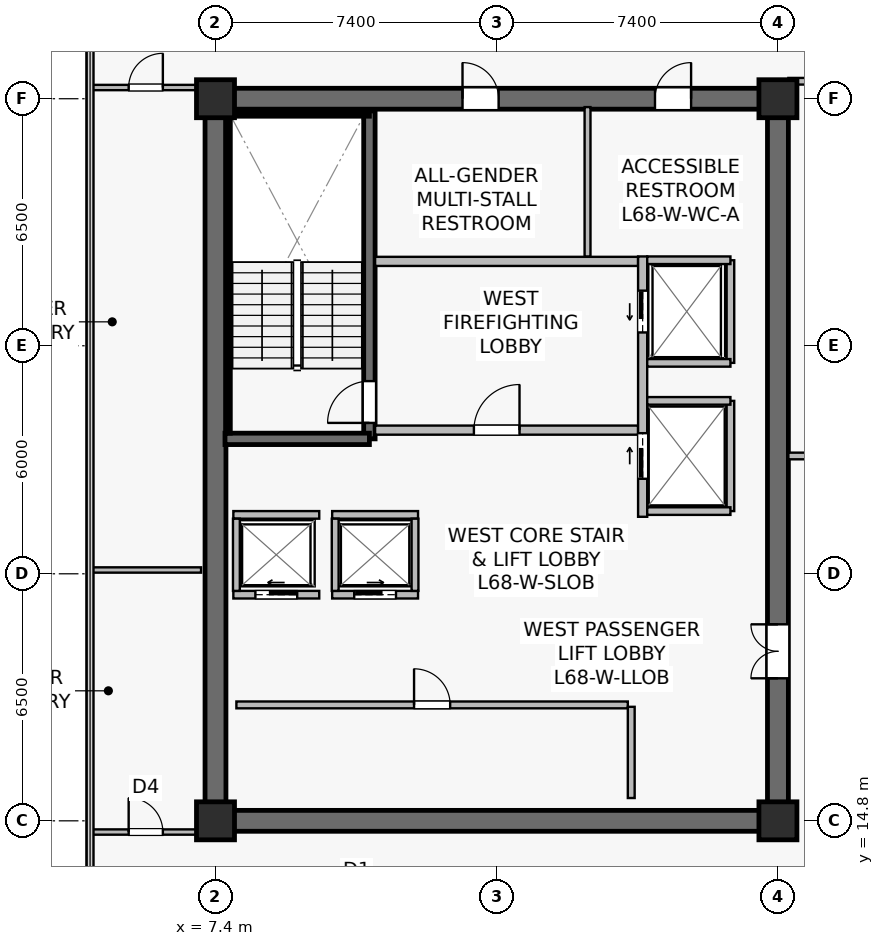
"""IFC4 building model, lengths in metres.
Left out: names, types, materials, properties, quantities, classifications, styles, units other than length and angle.
Written with IfcOpenShell. Run it as: python <this file> out.ifc"""

import sys

from ifc_helpers import new_model, si_unit, direction, frame, frame_2d, origin, origin_2d, place, context, subcontext, project, spatial, rectangle, extrude, source, transform, mapped, element, fill, save


model = new_model("IFC4")
c1 = context("Model", 3, precision=1e-05, world=origin(), true_north=direction((0.0, 1.0)))
c2 = subcontext(c1, "Body", "Model", "MODEL_VIEW")
j1 = project(units=[si_unit("LENGTHUNIT", "METRE"), si_unit("PLANEANGLEUNIT", "RADIAN")], contexts=[c1])
p1 = place(None, origin())
s1 = spatial("IfcSite", under=j1, at=p1, CompositionType="ELEMENT")
p2 = place(p1, origin())
s2 = spatial("IfcBuilding", under=s1, at=p2, CompositionType="ELEMENT")
p3 = place(p2, frame((0.0, 0.0, 283.4)))
s3 = spatial("IfcBuildingStorey", under=s2, at=p3, CompositionType="ELEMENT", Elevation=283.4)
p4 = place(p3, frame((7.125, 14.8, 0.0), z_axis=(0.0, 0.0, 1.0), x_axis=(1.0, 0.0, 0.0)))
e1 = element("IfcWall", 1, at=p4, inside=s3, PredefinedType="SHEAR", context=c2, shape_type="SweptSolid", body=[
    extrude(rectangle(XDim=15.35, YDim=0.55, at=frame_2d((7.675, 0.0))), origin(), (0.0, 0.0, 1.0), 3.8),
])
p5 = place(p3, frame((7.125, 33.8, 0.0), z_axis=(0.0, 0.0, 1.0), x_axis=(1.0, 0.0, 0.0)))
e2 = element("IfcWall", 2, at=p5, inside=s3, PredefinedType="SHEAR", context=c2, shape_type="SweptSolid", body=[
    extrude(rectangle(XDim=15.35, YDim=0.55, at=frame_2d((7.675, 0.0))), origin(), (0.0, 0.0, 1.0), 3.8),
])
p6 = place(p5, frame((6.775, 0.0, 0.0)))
e3 = element("IfcOpeningElement", 3, at=p6, cuts=e2, PredefinedType="OPENING", context=c2, shape_type="SweptSolid", body=[
    extrude(rectangle(XDim=0.95, YDim=2.15, at=frame_2d((0.475, 1.075))), frame((0.0, 0.285, 0.0), z_axis=(0.0, -1.0, 0.0), x_axis=(1.0, 0.0, 0.0)), (0.0, 0.0, 1.0), 0.57),
])
p7 = place(p5, frame((11.84, 0.0, 0.0)))
e4 = element("IfcOpeningElement", 4, at=p7, cuts=e2, PredefinedType="OPENING", context=c2, shape_type="SweptSolid", body=[
    extrude(rectangle(XDim=0.95, YDim=2.15, at=frame_2d((0.475, 1.075))), frame((0.0, 0.285, 0.0), z_axis=(0.0, -1.0, 0.0), x_axis=(1.0, 0.0, 0.0)), (0.0, 0.0, 1.0), 0.57),
])
p8 = place(p3, frame((7.4, 15.075, 0.0), z_axis=(0.0, 0.0, 1.0), x_axis=(0.0, 1.0, 0.0)))
e5 = element("IfcWall", 5, at=p8, inside=s3, PredefinedType="SHEAR", context=c2, shape_type="SweptSolid", body=[
    extrude(rectangle(XDim=18.45, YDim=0.55, at=frame_2d((9.225, 0.0))), origin(), (0.0, 0.0, 1.0), 3.8),
])
p9 = place(p3, frame((22.2, 15.075, 0.0), z_axis=(0.0, 0.0, 1.0), x_axis=(0.0, 1.0, 0.0)))
e6 = element("IfcWall", 6, at=p9, inside=s3, PredefinedType="SHEAR", context=c2, shape_type="SweptSolid", body=[
    extrude(rectangle(XDim=18.45, YDim=0.55, at=frame_2d((9.225, 0.0))), origin(), (0.0, 0.0, 1.0), 3.8),
])
p10 = place(p9, frame((3.475, 0.0, 0.0)))
e7 = element("IfcOpeningElement", 7, at=p10, cuts=e6, PredefinedType="OPENING", context=c2, shape_type="SweptSolid", body=[
    extrude(rectangle(XDim=1.42, YDim=2.2, at=frame_2d((0.71, 1.1))), frame((0.0, 0.285, 0.0), z_axis=(0.0, -1.0, 0.0), x_axis=(1.0, 0.0, 0.0)), (0.0, 0.0, 1.0), 0.57),
])
p11 = place(p3, frame((11.45, 24.85, 0.0), z_axis=(0.0, 0.0, 1.0), x_axis=(0.0, 1.0, 0.0)))
e8 = element("IfcWall", 8, at=p11, inside=s3, PredefinedType="SHEAR", context=c2, shape_type="SweptSolid", body=[
    extrude(rectangle(XDim=8.63, YDim=0.3, at=frame_2d((4.315, 0.0))), origin(), (0.0, 0.0, 1.0), 3.8),
])
p12 = place(p11, frame((0.42, 0.0, 0.0)))
e9 = element("IfcOpeningElement", 9, at=p12, cuts=e8, PredefinedType="OPENING", context=c2, shape_type="SweptSolid", body=[
    extrude(rectangle(XDim=1.1, YDim=2.15, at=frame_2d((0.55, 1.075))), frame((0.0, 0.16, 0.0), z_axis=(0.0, -1.0, 0.0), x_axis=(1.0, 0.0, 0.0)), (0.0, 0.0, 1.0), 0.32),
])
p13 = place(p3, frame((7.65, 24.85, 0.0), z_axis=(0.0, 0.0, 1.0), x_axis=(1.0, 0.0, 0.0)))
e10 = element("IfcWall", 10, at=p13, inside=s3, PredefinedType="SHEAR", context=c2, shape_type="SweptSolid", body=[
    extrude(rectangle(XDim=3.8, YDim=0.3, at=frame_2d((1.9, 0.0))), origin(), (0.0, 0.0, 1.0), 3.8),
])
p14 = place(p3, frame((7.73, 33.4, 0.0), z_axis=(0.0, 0.0, 1.0), x_axis=(1.0, 0.0, 0.0)))
e11 = element("IfcWall", 11, at=p14, inside=s3, PredefinedType="SOLIDWALL", context=c2, shape_type="SweptSolid", body=[
    extrude(rectangle(XDim=3.72, YDim=0.12, at=frame_2d((1.86, 0.0))), origin(), (0.0, 0.0, 1.0), 3.8),
])
p15 = place(p3, frame((7.73, 25.0, 0.0), z_axis=(0.0, 0.0, 1.0), x_axis=(0.0, 1.0, 0.0)))
e12 = element("IfcWall", 12, at=p15, inside=s3, PredefinedType="SOLIDWALL", context=c2, shape_type="SweptSolid", body=[
    extrude(rectangle(XDim=8.32, YDim=0.12, at=frame_2d((4.16, 0.0))), origin(), (0.0, 0.0, 1.0), 3.8),
])
m1 = source(origin(), c2, "Body", "SweptSolid", [
    extrude(rectangle(XDim=1.0, YDim=1.0, at=origin_2d()), origin(), (0.0, 0.0, 1.0), 4.1),
])
for number, where, z_axis, x_axis in (
    (13, (7.4, 14.8, 0.0), (0.0, 0.0, 1.0), (1.0, 0.0, 0.0)),
    (14, (22.2, 14.8, 0.0), (0.0, 0.0, 1.0), (1.0, 0.0, 0.0)),
    (15, (7.4, 33.8, 0.0), (0.0, 0.0, 1.0), (1.0, 0.0, 0.0)),
    (16, (22.2, 33.8, 0.0), (0.0, 0.0, 1.0), (1.0, 0.0, 0.0)),
):
    element("IfcColumn", number, at=place(p3, frame(where, z_axis=z_axis, x_axis=x_axis)), inside=s3, PredefinedType="COLUMN", context=c2, shape_type="MappedRepresentation", body=[
        mapped(m1, transform((0.0, 0.0, 0.0), scale=1.0)),
    ])
p16 = place(p3, frame((11.6, 25.08, 0.0), z_axis=(0.0, 0.0, 1.0), x_axis=(1.0, 0.0, 0.0)))
e17 = element("IfcWall", 17, at=p16, inside=s3, PredefinedType="SOLIDWALL", context=c2, shape_type="SweptSolid", body=[
    extrude(rectangle(XDim=6.92, YDim=0.24, at=frame_2d((3.46, 0.0))), origin(), (0.0, 0.0, 1.0), 3.197),
])
p17 = place(p16, frame((2.6, 0.0, 0.0)))
e18 = element("IfcOpeningElement", 18, at=p17, cuts=e17, PredefinedType="OPENING", context=c2, shape_type="SweptSolid", body=[
    extrude(rectangle(XDim=1.2, YDim=2.16, at=frame_2d((0.6, 1.08))), frame((0.0, 0.13, 0.0), z_axis=(0.0, -1.0, 0.0), x_axis=(1.0, 0.0, 0.0)), (0.0, 0.0, 1.0), 0.26),
])
p18 = place(p3, frame((11.6, 29.52, 0.0), z_axis=(0.0, 0.0, 1.0), x_axis=(1.0, 0.0, 0.0)))
e19 = element("IfcWall", 19, at=p18, inside=s3, PredefinedType="SOLIDWALL", context=c2, shape_type="SweptSolid", body=[
    extrude(rectangle(XDim=6.92, YDim=0.24, at=frame_2d((3.46, 0.0))), origin(), (0.0, 0.0, 1.0), 3.197),
])
p19 = place(p3, frame((18.64, 22.8, 0.0), z_axis=(0.0, 0.0, 1.0), x_axis=(0.0, 1.0, 0.0)))
e20 = element("IfcWall", 20, at=p19, inside=s3, PredefinedType="SOLIDWALL", context=c2, shape_type="SweptSolid", body=[
    extrude(rectangle(XDim=6.85, YDim=0.24, at=frame_2d((3.425, 0.0))), origin(), (0.0, 0.0, 1.0), 2.935),
])
p20 = place(p19, frame((4.85, 0.0, 0.0)))
e21 = element("IfcOpeningElement", 21, at=p20, cuts=e20, PredefinedType="OPENING", context=c2, shape_type="SweptSolid", body=[
    extrude(rectangle(XDim=1.1, YDim=2.22, at=frame_2d((0.55, 1.11))), frame((0.0, 0.13, 0.0), z_axis=(0.0, -1.0, 0.0), x_axis=(1.0, 0.0, 0.0)), (0.0, 0.0, 1.0), 0.26),
])
p21 = place(p19, frame((1.0, 0.0, 0.0)))
e22 = element("IfcOpeningElement", 22, at=p21, cuts=e20, PredefinedType="OPENING", context=c2, shape_type="SweptSolid", body=[
    extrude(rectangle(XDim=1.2, YDim=2.22, at=frame_2d((0.6, 1.11))), frame((0.0, 0.13, 0.0), z_axis=(0.0, -1.0, 0.0), x_axis=(1.0, 0.0, 0.0)), (0.0, 0.0, 1.0), 0.26),
])
p22 = place(p3, frame((7.87, 20.75, 0.0), z_axis=(0.0, 0.0, 1.0), x_axis=(1.0, 0.0, 0.0)))
e23 = element("IfcWall", 23, at=p22, inside=s3, PredefinedType="SOLIDWALL", context=c2, shape_type="SweptSolid", body=[
    extrude(rectangle(XDim=2.26, YDim=0.2, at=frame_2d((1.13, 0.0))), origin(), (0.0, 0.0, 1.0), 3.8),
])
p23 = place(p22, frame((0.58, 0.0, 0.0)))
e24 = element("IfcOpeningElement", 24, at=p23, cuts=e23, PredefinedType="OPENING", context=c2, shape_type="SweptSolid", body=[
    extrude(rectangle(XDim=1.1, YDim=2.22, at=frame_2d((0.55, 1.11))), frame((0.0, 0.11, 0.0), z_axis=(0.0, -1.0, 0.0), x_axis=(1.0, 0.0, 0.0)), (0.0, 0.0, 1.0), 0.22),
])
p24 = place(p3, frame((7.87, 22.85, 0.0), z_axis=(0.0, 0.0, 1.0), x_axis=(1.0, 0.0, 0.0)))
e25 = element("IfcWall", 25, at=p24, inside=s3, PredefinedType="SOLIDWALL", context=c2, shape_type="SweptSolid", body=[
    extrude(rectangle(XDim=2.26, YDim=0.2, at=frame_2d((1.13, 0.0))), origin(), (0.0, 0.0, 1.0), 3.8),
])
p25 = place(p3, frame((7.95, 20.85, 0.0), z_axis=(0.0, 0.0, 1.0), x_axis=(0.0, 1.0, 0.0)))
e26 = element("IfcWall", 26, at=p25, inside=s3, PredefinedType="SOLIDWALL", context=c2, shape_type="SweptSolid", body=[
    extrude(rectangle(XDim=1.9, YDim=0.18, at=frame_2d((0.95, 0.0))), origin(), (0.0, 0.0, 1.0), 3.8),
])
p26 = place(p3, frame((10.47, 20.75, 0.0), z_axis=(0.0, 0.0, 1.0), x_axis=(1.0, 0.0, 0.0)))
e27 = element("IfcWall", 27, at=p26, inside=s3, PredefinedType="SOLIDWALL", context=c2, shape_type="SweptSolid", body=[
    extrude(rectangle(XDim=2.26, YDim=0.2, at=frame_2d((1.13, 0.0))), origin(), (0.0, 0.0, 1.0), 3.8),
])
p27 = place(p26, frame((0.58, 0.0, 0.0)))
e28 = element("IfcOpeningElement", 28, at=p27, cuts=e27, PredefinedType="OPENING", context=c2, shape_type="SweptSolid", body=[
    extrude(rectangle(XDim=1.1, YDim=2.22, at=frame_2d((0.55, 1.11))), frame((0.0, 0.11, 0.0), z_axis=(0.0, -1.0, 0.0), x_axis=(1.0, 0.0, 0.0)), (0.0, 0.0, 1.0), 0.22),
])
p28 = place(p3, frame((10.47, 22.85, 0.0), z_axis=(0.0, 0.0, 1.0), x_axis=(1.0, 0.0, 0.0)))
e29 = element("IfcWall", 29, at=p28, inside=s3, PredefinedType="SOLIDWALL", context=c2, shape_type="SweptSolid", body=[
    extrude(rectangle(XDim=2.26, YDim=0.2, at=frame_2d((1.13, 0.0))), origin(), (0.0, 0.0, 1.0), 3.8),
])
for number, where, z_axis, x_axis in (
    (30, (10.55, 20.85, 0.0), (0.0, 0.0, 1.0), (0.0, 1.0, 0.0)),
    (31, (12.65, 20.85, 0.0), (0.0, 0.0, 1.0), (0.0, 1.0, 0.0)),
):
    element("IfcWall", number, at=place(p3, frame(where, z_axis=z_axis, x_axis=x_axis)), inside=s3, PredefinedType="SOLIDWALL", context=c2, shape_type="SweptSolid", body=[
        extrude(rectangle(XDim=1.9, YDim=0.18, at=frame_2d((0.95, 0.0))), origin(), (0.0, 0.0, 1.0), 3.8),
    ])
p29 = place(p3, frame((20.95, 26.85, 0.0), z_axis=(0.0, 0.0, 1.0), x_axis=(0.0, 1.0, 0.0)))
e32 = element("IfcWall", 32, at=p29, inside=s3, PredefinedType="SOLIDWALL", context=c2, shape_type="SweptSolid", body=[
    extrude(rectangle(XDim=2.7, YDim=0.2, at=frame_2d((1.35, 0.0))), origin(), (0.0, 0.0, 1.0), 3.8),
])
p30 = place(p3, frame((18.76, 29.55, 0.0), z_axis=(0.0, 0.0, 1.0), x_axis=(1.0, 0.0, 0.0)))
e33 = element("IfcWall", 33, at=p30, inside=s3, PredefinedType="SOLIDWALL", context=c2, shape_type="SweptSolid", body=[
    extrude(rectangle(XDim=2.19, YDim=0.2, at=frame_2d((1.095, 0.0))), origin(), (0.0, 0.0, 1.0), 3.8),
])
p31 = place(p3, frame((18.76, 26.85, 0.0), z_axis=(0.0, 0.0, 1.0), x_axis=(1.0, 0.0, 0.0)))
e34 = element("IfcWall", 34, at=p31, inside=s3, PredefinedType="SOLIDWALL", context=c2, shape_type="SweptSolid", body=[
    extrude(rectangle(XDim=2.19, YDim=0.2, at=frame_2d((1.095, 0.0))), origin(), (0.0, 0.0, 1.0), 3.197),
])
p32 = place(p3, frame((20.95, 22.95, 0.0), z_axis=(0.0, 0.0, 1.0), x_axis=(0.0, 1.0, 0.0)))
e35 = element("IfcWall", 35, at=p32, inside=s3, PredefinedType="SOLIDWALL", context=c2, shape_type="SweptSolid", body=[
    extrude(rectangle(XDim=2.9, YDim=0.2, at=frame_2d((1.45, 0.0))), origin(), (0.0, 0.0, 1.0), 2.935),
])
for number, where, z_axis, x_axis in (
    (36, (18.76, 25.85, 0.0), (0.0, 0.0, 1.0), (1.0, 0.0, 0.0)),
    (37, (18.76, 22.95, 0.0), (0.0, 0.0, 1.0), (1.0, 0.0, 0.0)),
):
    element("IfcWall", number, at=place(p3, frame(where, z_axis=z_axis, x_axis=x_axis)), inside=s3, PredefinedType="SOLIDWALL", context=c2, shape_type="SweptSolid", body=[
        extrude(rectangle(XDim=2.19, YDim=0.2, at=frame_2d((1.095, 0.0))), origin(), (0.0, 0.0, 1.0), 3.8),
    ])
p33 = place(p3, frame((7.95, 17.85, 0.0), z_axis=(0.0, 0.0, 1.0), x_axis=(1.0, 0.0, 0.0)))
e38 = element("IfcWall", 38, at=p33, inside=s3, PredefinedType="SOLIDWALL", context=c2, shape_type="SweptSolid", body=[
    extrude(rectangle(XDim=10.3, YDim=0.18, at=frame_2d((5.15, 0.0))), origin(), (0.0, 0.0, 1.0), 3.197),
])
p34 = place(p33, frame((4.675, 0.0, 0.0)))
e39 = element("IfcOpeningElement", 39, at=p34, cuts=e38, PredefinedType="OPENING", context=c2, shape_type="SweptSolid", body=[
    extrude(rectangle(XDim=0.95, YDim=2.15, at=frame_2d((0.475, 1.075))), frame((0.0, 0.1, 0.0), z_axis=(0.0, -1.0, 0.0), x_axis=(1.0, 0.0, 0.0)), (0.0, 0.0, 1.0), 0.2),
])
p35 = place(p3, frame((18.34, 15.4, 0.0), z_axis=(0.0, 0.0, 1.0), x_axis=(0.0, 1.0, 0.0)))
e40 = element("IfcWall", 40, at=p35, inside=s3, PredefinedType="SOLIDWALL", context=c2, shape_type="SweptSolid", body=[
    extrude(rectangle(XDim=2.4, YDim=0.18, at=frame_2d((1.2, 0.0))), origin(), (0.0, 0.0, 1.0), 3.8),
])
p36 = place(p3, frame((17.19, 29.65, 0.0), z_axis=(0.0, 0.0, 1.0), x_axis=(0.0, 1.0, 0.0)))
e41 = element("IfcWall", 41, at=p36, inside=s3, PredefinedType="PLUMBINGWALL", context=c2, shape_type="SweptSolid", body=[
    extrude(rectangle(XDim=3.93, YDim=0.155, at=frame_2d((1.965, 0.0))), origin(), (0.0, 0.0, 1.0), 3.8),
])
p37 = place(p3, frame((22.475, 34.26, 0.0), z_axis=(0.0, 0.0, 1.0), x_axis=(1.0, 0.0, 0.0)))
e42 = element("IfcWall", 42, at=p37, inside=s3, PredefinedType="PARTITIONING", context=c2, shape_type="SweptSolid", body=[
    extrude(rectangle(XDim=4.025, YDim=0.175, at=frame_2d((2.012, 0.0))), origin(), (0.0, 0.0, 1.0), 3.535),
])
p38 = place(p3, frame((22.475, 24.4, 0.0), z_axis=(0.0, 0.0, 1.0), x_axis=(1.0, 0.0, 0.0)))
e43 = element("IfcWall", 43, at=p38, inside=s3, PredefinedType="PARTITIONING", context=c2, shape_type="SweptSolid", body=[
    extrude(rectangle(XDim=4.025, YDim=0.175, at=frame_2d((2.012, 0.0))), origin(), (0.0, 0.0, 1.0), 3.8),
])
p39 = place(p38, frame((1.35, 0.0, 0.0)))
e44 = element("IfcOpeningElement", 44, at=p39, cuts=e43, PredefinedType="OPENING", context=c2, shape_type="SweptSolid", body=[
    extrude(rectangle(XDim=0.95, YDim=2.15, at=frame_2d((0.475, 1.075))), frame((0.0, 0.098, 0.0), z_axis=(0.0, -1.0, 0.0), x_axis=(1.0, 0.0, 0.0)), (0.0, 0.0, 1.0), 0.195),
])
p40 = place(p3, frame((4.11, 21.4, 0.0), z_axis=(0.0, 0.0, 1.0), x_axis=(1.0, 0.0, 0.0)))
e45 = element("IfcWall", 45, at=p40, inside=s3, PredefinedType="PARTITIONING", context=c2, shape_type="SweptSolid", body=[
    extrude(rectangle(XDim=2.91, YDim=0.14, at=frame_2d((1.455, 0.0))), origin(), (0.0, 0.0, 1.0), 3.8),
])
p41 = place(p3, frame((4.11, 14.505, 0.0), z_axis=(0.0, 0.0, 1.0), x_axis=(1.0, 0.0, 0.0)))
e46 = element("IfcWall", 46, at=p41, inside=s3, PredefinedType="PARTITIONING", context=c2, shape_type="SweptSolid", body=[
    extrude(rectangle(XDim=2.91, YDim=0.14, at=frame_2d((1.455, 0.0))), origin(), (0.0, 0.0, 1.0), 3.8),
])
p42 = place(p41, frame((1.005, 0.0, 0.0)))
e47 = element("IfcOpeningElement", 47, at=p42, cuts=e46, PredefinedType="OPENING", context=c2, shape_type="SweptSolid", body=[
    extrude(rectangle(XDim=0.9, YDim=2.1, at=frame_2d((0.45, 1.05))), frame((0.0, 0.08, 0.0), z_axis=(0.0, -1.0, 0.0), x_axis=(1.0, 0.0, 0.0)), (0.0, 0.0, 1.0), 0.16),
])
p43 = place(p3, frame((4.11, 34.095, 0.0), z_axis=(0.0, 0.0, 1.0), x_axis=(1.0, 0.0, 0.0)))
e48 = element("IfcWall", 48, at=p43, inside=s3, PredefinedType="PARTITIONING", context=c2, shape_type="SweptSolid", body=[
    extrude(rectangle(XDim=2.91, YDim=0.14, at=frame_2d((1.455, 0.0))), origin(), (0.0, 0.0, 1.0), 3.8),
])
p44 = place(p43, frame((1.005, 0.0, 0.0)))
e49 = element("IfcOpeningElement", 49, at=p44, cuts=e48, PredefinedType="OPENING", context=c2, shape_type="SweptSolid", body=[
    extrude(rectangle(XDim=0.9, YDim=2.1, at=frame_2d((0.45, 1.05))), frame((0.0, 0.08, 0.0), z_axis=(0.0, -1.0, 0.0), x_axis=(1.0, 0.0, 0.0)), (0.0, 0.0, 1.0), 0.16),
])
m2 = source(origin(), c2, "Body", "SweptSolid", [
    extrude(rectangle(XDim=1.1, YDim=2.15, at=frame_2d((0.55, 1.075))), frame((0.0, 0.025, 0.0), z_axis=(0.0, -1.0, 0.0), x_axis=(1.0, 0.0, 0.0)), (0.0, 0.0, 1.0), 0.05),
])
p45 = place(p12, origin())
e50 = element("IfcDoor", 50, at=p45, inside=s3, OperationType="SINGLE_SWING_LEFT", PredefinedType="DOOR", context=c2, shape_type="MappedRepresentation", body=[
    mapped(m2, transform((0.0, 0.0, 0.0), scale=1.0)),
])
fill(e9, e50)
m3 = source(origin(), c2, "Body", "SweptSolid", [
    extrude(rectangle(XDim=1.2, YDim=2.16, at=frame_2d((0.6, 1.08))), frame((0.0, 0.025, 0.0), z_axis=(0.0, -1.0, 0.0), x_axis=(1.0, 0.0, 0.0)), (0.0, 0.0, 1.0), 0.05),
])
p46 = place(p17, origin())
e51 = element("IfcDoor", 51, at=p46, inside=s3, OperationType="SINGLE_SWING_RIGHT", PredefinedType="DOOR", context=c2, shape_type="MappedRepresentation", body=[
    mapped(m3, transform((0.0, 0.0, 0.0), scale=1.0)),
])
fill(e18, e51)
m4 = source(origin(), c2, "Body", "SweptSolid", [
    extrude(rectangle(XDim=1.1, YDim=2.22, at=frame_2d((0.55, 1.11))), frame((0.0, 0.025, 0.0), z_axis=(0.0, -1.0, 0.0), x_axis=(1.0, 0.0, 0.0)), (0.0, 0.0, 1.0), 0.05),
])
p47 = place(p23, origin())
e52 = element("IfcDoor", 52, at=p47, inside=s3, OperationType="SLIDING_TO_LEFT", PredefinedType="USERDEFINED", context=c2, shape_type="MappedRepresentation", body=[
    mapped(m4, transform((0.0, 0.0, 0.0), scale=1.0)),
])
fill(e24, e52)
p48 = place(p27, origin())
e53 = element("IfcDoor", 53, at=p48, inside=s3, OperationType="SLIDING_TO_RIGHT", PredefinedType="USERDEFINED", context=c2, shape_type="MappedRepresentation", body=[
    mapped(m4, transform((0.0, 0.0, 0.0), scale=1.0)),
])
fill(e28, e53)
p49 = place(p20, origin())
e54 = element("IfcDoor", 54, at=p49, inside=s3, OperationType="SLIDING_TO_LEFT", PredefinedType="USERDEFINED", context=c2, shape_type="MappedRepresentation", body=[
    mapped(m4, transform((0.0, 0.0, 0.0), scale=1.0)),
])
fill(e21, e54)
m5 = source(origin(), c2, "Body", "SweptSolid", [
    extrude(rectangle(XDim=1.2, YDim=2.22, at=frame_2d((0.6, 1.11))), frame((0.0, 0.025, 0.0), z_axis=(0.0, -1.0, 0.0), x_axis=(1.0, 0.0, 0.0)), (0.0, 0.0, 1.0), 0.05),
])
p50 = place(p21, origin())
e55 = element("IfcDoor", 55, at=p50, inside=s3, OperationType="SLIDING_TO_RIGHT", PredefinedType="USERDEFINED", context=c2, shape_type="MappedRepresentation", body=[
    mapped(m5, transform((0.0, 0.0, 0.0), scale=1.0)),
])
fill(e22, e55)
m6 = source(origin(), c2, "Body", "SweptSolid", [
    extrude(rectangle(XDim=0.95, YDim=2.15, at=frame_2d((0.475, 1.075))), frame((0.0, 0.025, 0.0), z_axis=(0.0, -1.0, 0.0), x_axis=(1.0, 0.0, 0.0)), (0.0, 0.0, 1.0), 0.05),
])
p51 = place(p34, origin())
e56 = element("IfcDoor", 56, at=p51, inside=s3, OperationType="SINGLE_SWING_LEFT", PredefinedType="DOOR", context=c2, shape_type="MappedRepresentation", body=[
    mapped(m6, transform((0.0, 0.0, 0.0), scale=1.0)),
])
fill(e39, e56)
m7 = source(origin(), c2, "Body", "SweptSolid", [
    extrude(rectangle(XDim=1.42, YDim=2.2, at=frame_2d((0.71, 1.1))), frame((0.0, 0.025, 0.0), z_axis=(0.0, -1.0, 0.0), x_axis=(1.0, 0.0, 0.0)), (0.0, 0.0, 1.0), 0.05),
])
p52 = place(p10, origin())
e57 = element("IfcDoor", 57, at=p52, inside=s3, OperationType="DOUBLE_DOOR_SINGLE_SWING", PredefinedType="DOOR", context=c2, shape_type="MappedRepresentation", body=[
    mapped(m7, transform((0.0, 0.0, 0.0), scale=1.0)),
])
fill(e7, e57)
p53 = place(p6, origin())
e58 = element("IfcDoor", 58, at=p53, inside=s3, OperationType="SINGLE_SWING_LEFT", PredefinedType="DOOR", context=c2, shape_type="MappedRepresentation", body=[
    mapped(m6, transform((0.0, 0.0, 0.0), scale=1.0)),
])
fill(e3, e58)
p54 = place(p7, origin())
e59 = element("IfcDoor", 59, at=p54, inside=s3, OperationType="SINGLE_SWING_RIGHT", PredefinedType="DOOR", context=c2, shape_type="MappedRepresentation", body=[
    mapped(m6, transform((0.0, 0.0, 0.0), scale=1.0)),
])
fill(e4, e59)
m8 = source(origin(), c2, "Body", "SweptSolid", [
    extrude(rectangle(XDim=0.9, YDim=2.1, at=frame_2d((0.45, 1.05))), frame((0.0, 0.025, 0.0), z_axis=(0.0, -1.0, 0.0), x_axis=(1.0, 0.0, 0.0)), (0.0, 0.0, 1.0), 0.05),
])
p55 = place(p42, origin())
e60 = element("IfcDoor", 60, at=p55, inside=s3, OperationType="SINGLE_SWING_LEFT", PredefinedType="DOOR", context=c2, shape_type="MappedRepresentation", body=[
    mapped(m8, transform((0.0, 0.0, 0.0), scale=1.0)),
])
fill(e47, e60)
p56 = place(p44, origin())
e61 = element("IfcDoor", 61, at=p56, inside=s3, OperationType="SINGLE_SWING_RIGHT", PredefinedType="DOOR", context=c2, shape_type="MappedRepresentation", body=[
    mapped(m8, transform((0.0, 0.0, 0.0), scale=1.0)),
])
fill(e49, e61)
save(model, sys.argv[1])
